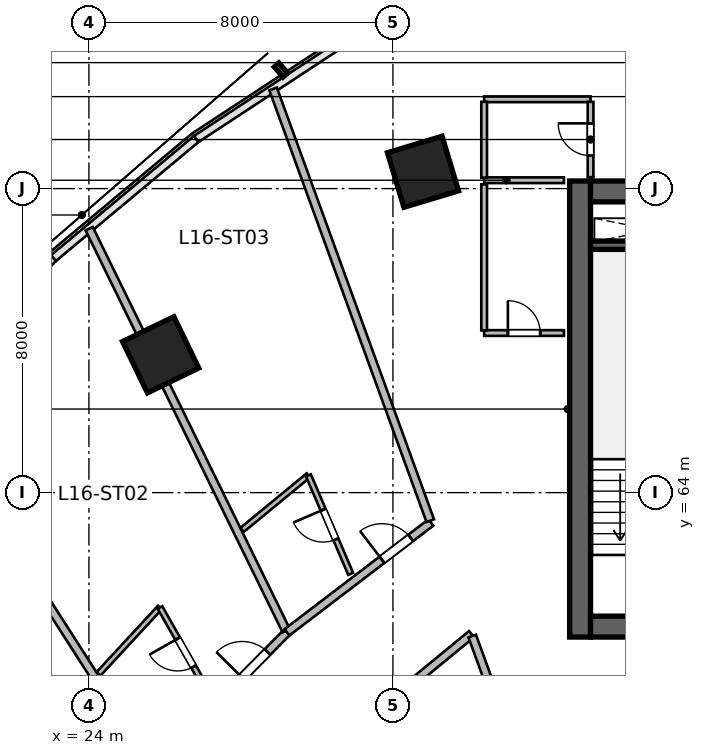
"""IFC4 building model, lengths in metres.
Left out: names, types, materials, properties, quantities, classifications, styles, units other than length and angle.
Written with IfcOpenShell. Run it as: python <this file> out.ifc"""

import sys

from ifc_helpers import new_model, si_unit, direction, frame, frame_2d, origin, origin_2d, place, context, subcontext, project, spatial, rectangle, extrude, source, transform, mapped, element, fill, save


model = new_model("IFC4")
c1 = context("Model", 3, precision=1e-05, world=origin(), true_north=direction((0.0, 1.0)))
c2 = subcontext(c1, "Body", "Model", "MODEL_VIEW")
j1 = project(units=[si_unit("LENGTHUNIT", "METRE"), si_unit("PLANEANGLEUNIT", "RADIAN")], contexts=[c1])
p1 = place(None, origin())
s1 = spatial("IfcSite", under=j1, at=p1, CompositionType="ELEMENT")
p2 = place(p1, origin())
s2 = spatial("IfcBuilding", under=s1, at=p2, CompositionType="ELEMENT")
p3 = place(p2, frame((0.0, 0.0, 71.4)))
s3 = spatial("IfcBuildingStorey", under=s2, at=p3, CompositionType="ELEMENT", Elevation=71.4)
m1 = source(origin(), c2, "Body", "SweptSolid", [
    extrude(rectangle(XDim=12.0, YDim=0.55, at=frame_2d((6.0, 0.0))), origin(), (0.0, 0.0, 1.0), 3.6),
])
p4 = place(p3, frame((36.925, 60.2, 0.0), z_axis=(0.0, 0.0, 1.0), x_axis=(0.0, 1.0, 0.0)))
e1 = element("IfcWall", 1, at=p4, inside=s3, PredefinedType="SHEAR", context=c2, shape_type="MappedRepresentation", body=[
    mapped(m1, transform((0.0, 0.0, 0.0), scale=1.0)),
])
m2 = source(origin(), c2, "Body", "SweptSolid", [
    extrude(rectangle(XDim=21.6, YDim=0.55, at=frame_2d((10.8, 0.0))), origin(), (0.0, 0.0, 1.0), 3.6),
])
p5 = place(p3, frame((37.2, 60.475, 0.0), z_axis=(0.0, 0.0, 1.0), x_axis=(1.0, 0.0, 0.0)))
e2 = element("IfcWall", 2, at=p5, inside=s3, PredefinedType="SHEAR", context=c2, shape_type="MappedRepresentation", body=[
    mapped(m2, transform((0.0, 0.0, 0.0), scale=1.0)),
])
p6 = place(p5, frame((1.1, 0.0, 0.0)))
e3 = element("IfcOpeningElement", 3, at=p6, cuts=e2, PredefinedType="OPENING", context=c2, shape_type="SweptSolid", body=[
    extrude(rectangle(XDim=1.15, YDim=2.15, at=frame_2d((0.575, 1.075))), frame((0.0, 0.285, 0.0), z_axis=(0.0, -1.0, 0.0), x_axis=(1.0, 0.0, 0.0)), (0.0, 0.0, 1.0), 0.57),
])
p7 = place(p5, frame((19.5, 0.0, 0.0)))
e4 = element("IfcOpeningElement", 4, at=p7, cuts=e2, PredefinedType="OPENING", context=c2, shape_type="SweptSolid", body=[
    extrude(rectangle(XDim=0.9, YDim=2.1, at=frame_2d((0.45, 1.05))), frame((0.0, 0.285, 0.0), z_axis=(0.0, -1.0, 0.0), x_axis=(1.0, 0.0, 0.0)), (0.0, 0.0, 1.0), 0.57),
])
p8 = place(p5, frame((12.02, 0.0, 0.0)))
e5 = element("IfcOpeningElement", 5, at=p8, cuts=e2, PredefinedType="OPENING", context=c2, shape_type="SweptSolid", body=[
    extrude(rectangle(XDim=1.6, YDim=2.15, at=frame_2d((0.8, 1.075))), frame((0.0, 0.285, 0.0), z_axis=(0.0, -1.0, 0.0), x_axis=(1.0, 0.0, 0.0)), (0.0, 0.0, 1.0), 0.57),
])
p9 = place(p3, frame((37.2, 71.925, 0.0), z_axis=(0.0, 0.0, 1.0), x_axis=(1.0, 0.0, 0.0)))
e6 = element("IfcWall", 6, at=p9, inside=s3, PredefinedType="SHEAR", context=c2, shape_type="MappedRepresentation", body=[
    mapped(m2, transform((0.0, 0.0, 0.0), scale=1.0)),
])
p10 = place(p9, frame((1.2, 0.0, 0.0)))
e7 = element("IfcOpeningElement", 7, at=p10, cuts=e6, PredefinedType="OPENING", context=c2, shape_type="SweptSolid", body=[
    extrude(rectangle(XDim=0.9, YDim=2.1, at=frame_2d((0.45, 1.05))), frame((0.0, 0.285, 0.0), z_axis=(0.0, -1.0, 0.0), x_axis=(1.0, 0.0, 0.0)), (0.0, 0.0, 1.0), 0.57),
])
p11 = place(p9, frame((14.7, 0.0, 0.0)))
e8 = element("IfcOpeningElement", 8, at=p11, cuts=e6, PredefinedType="OPENING", context=c2, shape_type="SweptSolid", body=[
    extrude(rectangle(XDim=1.2, YDim=2.15, at=frame_2d((0.6, 1.075))), frame((0.0, 0.285, 0.0), z_axis=(0.0, -1.0, 0.0), x_axis=(1.0, 0.0, 0.0)), (0.0, 0.0, 1.0), 0.57),
])
p12 = place(p9, frame((4.15, 0.0, 0.0)))
e9 = element("IfcOpeningElement", 9, at=p12, cuts=e6, PredefinedType="OPENING", context=c2, shape_type="SweptSolid", body=[
    extrude(rectangle(XDim=1.3, YDim=2.15, at=frame_2d((0.65, 1.075))), frame((0.0, 0.285, 0.0), z_axis=(0.0, -1.0, 0.0), x_axis=(1.0, 0.0, 0.0)), (0.0, 0.0, 1.0), 0.57),
])
p13 = place(p9, frame((7.25, 0.0, 0.0)))
e10 = element("IfcOpeningElement", 10, at=p13, cuts=e6, PredefinedType="OPENING", context=c2, shape_type="SweptSolid", body=[
    extrude(rectangle(XDim=0.9, YDim=2.1, at=frame_2d((0.45, 1.05))), frame((0.0, 0.285, 0.0), z_axis=(0.0, -1.0, 0.0), x_axis=(1.0, 0.0, 0.0)), (0.0, 0.0, 1.0), 0.57),
])
p14 = place(p9, frame((10.95, 0.0, 0.0)))
e11 = element("IfcOpeningElement", 11, at=p14, cuts=e6, PredefinedType="OPENING", context=c2, shape_type="SweptSolid", body=[
    extrude(rectangle(XDim=0.9, YDim=2.1, at=frame_2d((0.45, 1.05))), frame((0.0, 0.285, 0.0), z_axis=(0.0, -1.0, 0.0), x_axis=(1.0, 0.0, 0.0)), (0.0, 0.0, 1.0), 0.57),
])
m3 = source(origin(), c2, "Body", "SweptSolid", [
    extrude(rectangle(XDim=3.27, YDim=0.22, at=frame_2d((1.635, 0.0))), origin(), (0.0, 0.0, 1.0), 3.6),
])
p15 = place(p3, frame((37.2, 70.51, 0.0), z_axis=(0.0, 0.0, 1.0), x_axis=(1.0, 0.0, 0.0)))
e12 = element("IfcWall", 12, at=p15, inside=s3, PredefinedType="SHEAR", context=c2, shape_type="MappedRepresentation", body=[
    mapped(m3, transform((0.0, 0.0, 0.0), scale=1.0)),
])
m4 = source(origin(), c2, "Body", "SweptSolid", [
    extrude(rectangle(XDim=1.5, YDim=1.5, at=origin_2d()), origin(), (0.0, 0.0, 1.0), 3.6),
])
for number, where, z_axis, x_axis in (
    (13, (25.888, 67.627, 0.0), (0.0, 0.0, 1.0), (-0.436, 0.9, 0.0)),
    (14, (32.791, 72.442, 0.0), (0.0, 0.0, 1.0), (-0.289, 0.957, 0.0)),
):
    element("IfcColumn", number, at=place(p3, frame(where, z_axis=z_axis, x_axis=x_axis)), inside=s3, PredefinedType="COLUMN", context=c2, shape_type="MappedRepresentation", body=[
        mapped(m4, transform((0.0, 0.0, 0.0), scale=1.0)),
    ])
m5 = source(origin(), c2, "Body", "SweptSolid", [
    extrude(rectangle(XDim=2.1, YDim=0.15, at=frame_2d((1.05, 0.0))), origin(), (0.0, 0.0, 1.0), 3.36),
])
p16 = place(p3, frame((34.4, 72.22, 0.0), z_axis=(0.0, 0.0, 1.0), x_axis=(1.0, 0.0, 0.0)))
e15 = element("IfcWall", 15, at=p16, inside=s3, PredefinedType="PARTITIONING", context=c2, shape_type="MappedRepresentation", body=[
    mapped(m5, transform((0.0, 0.0, 0.0), scale=1.0)),
])
m6 = source(origin(), c2, "Body", "SweptSolid", [
    extrude(rectangle(XDim=2.8, YDim=0.15, at=frame_2d((1.4, 0.0))), origin(), (0.0, 0.0, 1.0), 3.36),
])
p17 = place(p3, frame((34.4, 74.35, 0.0), z_axis=(0.0, 0.0, 1.0), x_axis=(1.0, 0.0, 0.0)))
e16 = element("IfcWall", 16, at=p17, inside=s3, PredefinedType="PARTITIONING", context=c2, shape_type="MappedRepresentation", body=[
    mapped(m6, transform((0.0, 0.0, 0.0), scale=1.0)),
])
m7 = source(origin(), c2, "Body", "SweptSolid", [
    extrude(rectangle(XDim=1.995, YDim=0.15, at=frame_2d((0.998, 0.0))), origin(), (0.0, 0.0, 1.0), 3.36),
])
p18 = place(p3, frame((34.4, 72.288, 0.0), z_axis=(0.0, 0.0, 1.0), x_axis=(0.0, 1.0, 0.0)))
e17 = element("IfcWall", 17, at=p18, inside=s3, PredefinedType="PARTITIONING", context=c2, shape_type="MappedRepresentation", body=[
    mapped(m7, transform((0.0, 0.0, 0.0), scale=1.0)),
])
m8 = source(origin(), c2, "Body", "SweptSolid", [
    extrude(rectangle(XDim=1.982, YDim=0.15, at=frame_2d((0.991, 0.0))), origin(), (0.0, 0.0, 1.0), 3.36),
])
p19 = place(p3, frame((37.2, 72.3, 0.0), z_axis=(0.0, 0.0, 1.0), x_axis=(0.0, 1.0, 0.0)))
e18 = element("IfcWall", 18, at=p19, inside=s3, PredefinedType="PARTITIONING", context=c2, shape_type="MappedRepresentation", body=[
    mapped(m8, transform((0.0, 0.0, 0.0), scale=1.0)),
])
p20 = place(p19, frame((0.566, 0.0, 0.0)))
e19 = element("IfcOpeningElement", 19, at=p20, cuts=e18, PredefinedType="OPENING", context=c2, shape_type="SweptSolid", body=[
    extrude(rectangle(XDim=0.85, YDim=2.1, at=frame_2d((0.425, 1.05))), frame((0.0, 0.085, 0.0), z_axis=(0.0, -1.0, 0.0), x_axis=(1.0, 0.0, 0.0)), (0.0, 0.0, 1.0), 0.17),
])
p21 = place(p3, frame((34.4, 68.2, 0.0), z_axis=(0.0, 0.0, 1.0), x_axis=(1.0, 0.0, 0.0)))
e20 = element("IfcWall", 20, at=p21, inside=s3, PredefinedType="PARTITIONING", context=c2, shape_type="MappedRepresentation", body=[
    mapped(m5, transform((0.0, 0.0, 0.0), scale=1.0)),
])
p22 = place(p21, frame((0.625, 0.0, 0.0)))
e21 = element("IfcOpeningElement", 21, at=p22, cuts=e20, PredefinedType="OPENING", context=c2, shape_type="SweptSolid", body=[
    extrude(rectangle(XDim=0.85, YDim=2.1, at=frame_2d((0.425, 1.05))), frame((0.0, 0.085, 0.0), z_axis=(0.0, -1.0, 0.0), x_axis=(1.0, 0.0, 0.0)), (0.0, 0.0, 1.0), 0.17),
])
m9 = source(origin(), c2, "Body", "SweptSolid", [
    extrude(rectangle(XDim=3.845, YDim=0.15, at=frame_2d((1.922, 0.0))), origin(), (0.0, 0.0, 1.0), 3.36),
])
p23 = place(p3, frame((34.4, 68.268, 0.0), z_axis=(0.0, 0.0, 1.0), x_axis=(0.0, 1.0, 0.0)))
e22 = element("IfcWall", 22, at=p23, inside=s3, PredefinedType="PARTITIONING", context=c2, shape_type="MappedRepresentation", body=[
    mapped(m9, transform((0.0, 0.0, 0.0), scale=1.0)),
])
m10 = source(origin(), c2, "Body", "SweptSolid", [
    extrude(rectangle(XDim=6.721, YDim=0.21, at=frame_2d((3.361, 0.0))), origin(), (0.0, 0.0, 1.0), 3.36),
])
p24 = place(p3, frame((28.874, 56.01, 0.0), z_axis=(0.0, 0.0, 1.0), x_axis=(0.772828051199, 0.63461547671, 0.0)))
e23 = element("IfcWall", 23, at=p24, inside=s3, PredefinedType="PARTITIONING", context=c2, shape_type="MappedRepresentation", body=[
    mapped(m10, transform((0.0, 0.0, 0.0), scale=1.0)),
])
m11 = source(origin(), c2, "Body", "SweptSolid", [
    extrude(rectangle(XDim=12.196, YDim=0.21, at=frame_2d((6.098, 0.0))), origin(), (0.0, 0.0, 1.0), 3.36),
])
p25 = place(p3, frame((38.258, 48.766, 0.0), z_axis=(0.0, 0.0, 1.0), x_axis=(-0.342022711534, 0.939691686031, 0.0)))
e24 = element("IfcWall", 24, at=p25, inside=s3, PredefinedType="PARTITIONING", context=c2, shape_type="MappedRepresentation", body=[
    mapped(m11, transform((0.0, 0.0, 0.0), scale=1.0)),
])
m12 = source(origin(), c2, "Body", "SweptSolid", [
    extrude(rectangle(XDim=11.432, YDim=0.21, at=frame_2d((5.716, 0.0))), origin(), (0.0, 0.0, 1.0), 3.36),
])
p26 = place(p3, frame((25.659, 56.805, 0.0), z_axis=(0.0, 0.0, 1.0), x_axis=(-0.540196183124, 0.841539115988, 0.0)))
e25 = element("IfcWall", 25, at=p26, inside=s3, PredefinedType="PARTITIONING", context=c2, shape_type="MappedRepresentation", body=[
    mapped(m12, transform((0.0, 0.0, 0.0), scale=1.0)),
])
m13 = source(origin(), c2, "Body", "SweptSolid", [
    extrude(rectangle(XDim=5.012, YDim=0.21, at=frame_2d((2.506, 0.0))), origin(), (0.0, 0.0, 1.0), 3.36),
])
p27 = place(p3, frame((25.685, 56.764, 0.0), z_axis=(0.0, 0.0, 1.0), x_axis=(0.703664626435, 0.710532260707, 0.0)))
e26 = element("IfcWall", 26, at=p27, inside=s3, PredefinedType="PARTITIONING", context=c2, shape_type="MappedRepresentation", body=[
    mapped(m13, transform((0.0, 0.0, 0.0), scale=1.0)),
])
p28 = place(p27, frame((3.335, 0.0, 0.0)))
e27 = element("IfcOpeningElement", 27, at=p28, cuts=e26, PredefinedType="OPENING", context=c2, shape_type="SweptSolid", body=[
    extrude(rectangle(XDim=0.95, YDim=2.15, at=frame_2d((0.475, 1.075))), frame((0.0, 0.115, 0.0), z_axis=(0.0, -1.0, 0.0), x_axis=(1.0, 0.0, 0.0)), (0.0, 0.0, 1.0), 0.23),
])
m14 = source(origin(), c2, "Body", "SweptSolid", [
    extrude(rectangle(XDim=11.775, YDim=0.21, at=frame_2d((5.887, 0.0))), origin(), (0.0, 0.0, 1.0), 2.644),
])
p29 = place(p3, frame((29.19, 60.371, 0.0), z_axis=(0.0, 0.0, 1.0), x_axis=(-0.4401500056, 0.897924257702, 0.0)))
e28 = element("IfcWall", 28, at=p29, inside=s3, PredefinedType="PARTITIONING", context=c2, shape_type="MappedRepresentation", body=[
    mapped(m14, transform((0.0, 0.0, 0.0), scale=1.0)),
])
m15 = source(origin(), c2, "Body", "SweptSolid", [
    extrude(rectangle(XDim=2.38, YDim=0.14, at=frame_2d((1.19, 0.0))), origin(), (0.0, 0.0, 1.0), 3.36),
])
p30 = place(p3, frame((24.253, 59.231, 0.0), z_axis=(0.0, 0.0, 1.0), x_axis=(0.679084816758, 0.734059814762, 0.0)))
e29 = element("IfcWall", 29, at=p30, inside=s3, PredefinedType="PARTITIONING", context=c2, shape_type="MappedRepresentation", body=[
    mapped(m15, transform((0.0, 0.0, 0.0), scale=1.0)),
])
m16 = source(origin(), c2, "Body", "SweptSolid", [
    extrude(rectangle(XDim=2.735, YDim=0.14, at=frame_2d((1.367, 0.0))), origin(), (0.0, 0.0, 1.0), 3.36),
])
p31 = place(p3, frame((27.219, 58.6, 0.0), z_axis=(0.0, 0.0, 1.0), x_axis=(-0.493694940578, 0.869635156631, 0.0)))
e30 = element("IfcWall", 30, at=p31, inside=s3, PredefinedType="PARTITIONING", context=c2, shape_type="MappedRepresentation", body=[
    mapped(m16, transform((0.0, 0.0, 0.0), scale=1.0)),
])
p32 = place(p31, frame((0.942, 0.0, 0.0)))
e31 = element("IfcOpeningElement", 31, at=p32, cuts=e30, PredefinedType="OPENING", context=c2, shape_type="SweptSolid", body=[
    extrude(rectangle(XDim=0.85, YDim=2.05, at=frame_2d((0.425, 1.025))), frame((0.0, 0.08, 0.0), z_axis=(0.0, -1.0, 0.0), x_axis=(1.0, 0.0, 0.0)), (0.0, 0.0, 1.0), 0.16),
])
m17 = source(origin(), c2, "Body", "SweptSolid", [
    extrude(rectangle(XDim=4.762, YDim=0.21, at=frame_2d((2.381, 0.0))), origin(), (0.0, 0.0, 1.0), 3.36),
])
p33 = place(p3, frame((29.212, 60.326, 0.0), z_axis=(0.0, 0.0, 1.0), x_axis=(0.795070295872, 0.60651729128, 0.0)))
e32 = element("IfcWall", 32, at=p33, inside=s3, PredefinedType="PARTITIONING", context=c2, shape_type="MappedRepresentation", body=[
    mapped(m17, transform((0.0, 0.0, 0.0), scale=1.0)),
])
p34 = place(p33, frame((3.144, 0.0, 0.0)))
e33 = element("IfcOpeningElement", 33, at=p34, cuts=e32, PredefinedType="OPENING", context=c2, shape_type="SweptSolid", body=[
    extrude(rectangle(XDim=0.95, YDim=2.15, at=frame_2d((0.475, 1.075))), frame((0.0, 0.115, 0.0), z_axis=(0.0, -1.0, 0.0), x_axis=(1.0, 0.0, 0.0)), (0.0, 0.0, 1.0), 0.23),
])
m18 = source(origin(), c2, "Body", "SweptSolid", [
    extrude(rectangle(XDim=12.088, YDim=0.21, at=frame_2d((6.044, 0.0))), origin(), (0.0, 0.0, 1.0), 3.36),
])
p35 = place(p3, frame((32.981, 63.262, 0.0), z_axis=(0.0, 0.0, 1.0), x_axis=(-0.34203007529, 0.939689005787, 0.0)))
e34 = element("IfcWall", 34, at=p35, inside=s3, PredefinedType="PARTITIONING", context=c2, shape_type="MappedRepresentation", body=[
    mapped(m18, transform((0.0, 0.0, 0.0), scale=1.0)),
])
m19 = source(origin(), c2, "Body", "SweptSolid", [
    extrude(rectangle(XDim=2.26, YDim=0.14, at=frame_2d((1.13, 0.0))), origin(), (0.0, 0.0, 1.0), 3.36),
])
p36 = place(p3, frame((28.029, 63.02, 0.0), z_axis=(0.0, 0.0, 1.0), x_axis=(0.772646789219, 0.634836151388, 0.0)))
e35 = element("IfcWall", 35, at=p36, inside=s3, PredefinedType="PARTITIONING", context=c2, shape_type="MappedRepresentation", body=[
    mapped(m19, transform((0.0, 0.0, 0.0), scale=1.0)),
])
m20 = source(origin(), c2, "Body", "SweptSolid", [
    extrude(rectangle(XDim=2.819, YDim=0.14, at=frame_2d((1.409, 0.0))), origin(), (0.0, 0.0, 1.0), 3.36),
])
p37 = place(p3, frame((30.888, 61.864, 0.0), z_axis=(0.0, 0.0, 1.0), x_axis=(-0.394420979357, 0.918929861874, 0.0)))
e36 = element("IfcWall", 36, at=p37, inside=s3, PredefinedType="PARTITIONING", context=c2, shape_type="MappedRepresentation", body=[
    mapped(m20, transform((0.0, 0.0, 0.0), scale=1.0)),
])
p38 = place(p37, frame((0.984, 0.0, 0.0)))
e37 = element("IfcOpeningElement", 37, at=p38, cuts=e36, PredefinedType="OPENING", context=c2, shape_type="SweptSolid", body=[
    extrude(rectangle(XDim=0.85, YDim=2.05, at=frame_2d((0.425, 1.025))), frame((0.0, 0.08, 0.0), z_axis=(0.0, -1.0, 0.0), x_axis=(1.0, 0.0, 0.0)), (0.0, 0.0, 1.0), 0.16),
])
m21 = source(origin(), c2, "Body", "SweptSolid", [
    extrude(rectangle(XDim=0.85, YDim=2.1, at=frame_2d((0.425, 1.05))), frame((0.0, 0.025, 0.0), z_axis=(0.0, -1.0, 0.0), x_axis=(1.0, 0.0, 0.0)), (0.0, 0.0, 1.0), 0.05),
])
p39 = place(p20, origin())
e38 = element("IfcDoor", 38, at=p39, inside=s3, OperationType="SINGLE_SWING_RIGHT", PredefinedType="DOOR", context=c2, shape_type="MappedRepresentation", body=[
    mapped(m21, transform((0.0, 0.0, 0.0), scale=1.0)),
])
fill(e19, e38)
p40 = place(p22, origin())
e39 = element("IfcDoor", 39, at=p40, inside=s3, OperationType="SINGLE_SWING_LEFT", PredefinedType="DOOR", context=c2, shape_type="MappedRepresentation", body=[
    mapped(m21, transform((0.0, 0.0, 0.0), scale=1.0)),
])
fill(e21, e39)
m22 = source(origin(), c2, "Body", "SweptSolid", [
    extrude(rectangle(XDim=0.95, YDim=2.15, at=frame_2d((0.475, 1.075))), frame((0.0, 0.025, 0.0), z_axis=(0.0, -1.0, 0.0), x_axis=(1.0, 0.0, 0.0)), (0.0, 0.0, 1.0), 0.05),
])
p41 = place(p28, origin())
e40 = element("IfcDoor", 40, at=p41, inside=s3, OperationType="SINGLE_SWING_LEFT", PredefinedType="DOOR", context=c2, shape_type="MappedRepresentation", body=[
    mapped(m22, transform((0.0, 0.0, 0.0), scale=1.0)),
])
fill(e27, e40)
m23 = source(origin(), c2, "Body", "SweptSolid", [
    extrude(rectangle(XDim=0.85, YDim=2.05, at=frame_2d((0.425, 1.025))), frame((0.0, 0.025, 0.0), z_axis=(0.0, -1.0, 0.0), x_axis=(1.0, 0.0, 0.0)), (0.0, 0.0, 1.0), 0.05),
])
p42 = place(p32, origin())
e41 = element("IfcDoor", 41, at=p42, inside=s3, OperationType="SINGLE_SWING_RIGHT", PredefinedType="DOOR", context=c2, shape_type="MappedRepresentation", body=[
    mapped(m23, transform((0.0, 0.0, 0.0), scale=1.0)),
])
fill(e31, e41)
p43 = place(p34, origin())
e42 = element("IfcDoor", 42, at=p43, inside=s3, OperationType="SINGLE_SWING_LEFT", PredefinedType="DOOR", context=c2, shape_type="MappedRepresentation", body=[
    mapped(m22, transform((0.0, 0.0, 0.0), scale=1.0)),
])
fill(e33, e42)
p44 = place(p38, origin())
e43 = element("IfcDoor", 43, at=p44, inside=s3, OperationType="SINGLE_SWING_RIGHT", PredefinedType="DOOR", context=c2, shape_type="MappedRepresentation", body=[
    mapped(m23, transform((0.0, 0.0, 0.0), scale=1.0)),
])
fill(e37, e43)
save(model, sys.argv[1])
